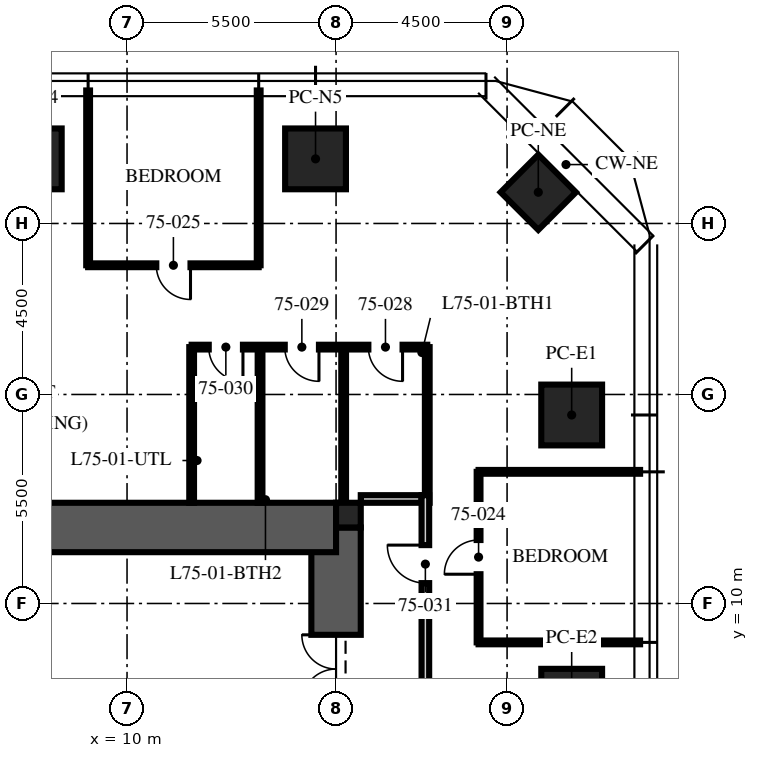
"""IFC4 building model, lengths in metres.
Left out: names, types, materials, properties, quantities, classifications, styles, units other than length and angle.
Written with IfcOpenShell. Run it as: python <this file> out.ifc"""

import sys

from ifc_helpers import new_model, si_unit, direction, frame, frame_2d, origin, origin_2d, place, context, subcontext, project, spatial, rectangle, extrude, element, fill, save


model = new_model("IFC4")
c1 = context("Model", 3, precision=1e-05, world=origin(), true_north=direction((0.0, 1.0)))
c2 = subcontext(c1, "Body", "Model", "MODEL_VIEW")
j1 = project(units=[si_unit("LENGTHUNIT", "METRE"), si_unit("PLANEANGLEUNIT", "RADIAN")], contexts=[c1])
p1 = place(None, origin())
s1 = spatial("IfcSite", under=j1, at=p1, CompositionType="ELEMENT")
p2 = place(p1, origin())
s2 = spatial("IfcBuilding", under=s1, at=p2, CompositionType="ELEMENT")
p3 = place(p2, frame((0.0, 0.0, 300.75)))
s3 = spatial("IfcBuildingStorey", under=s2, at=p3, CompositionType="ELEMENT", Elevation=300.75)
p4 = place(p3, frame((15.5, -12.0, -0.25), z_axis=(0.0, 0.0, 1.0), x_axis=(0.0, 1.0, 0.0)))
e1 = element("IfcWall", 1, at=p4, inside=s3, PredefinedType="SHEAR", context=c2, shape_type="SweptSolid", body=[
    extrude(rectangle(XDim=24.0, YDim=1.3, at=frame_2d((12.0, 0.0))), origin(), (0.0, 0.0, 1.0), 3.75),
])
p5 = place(p4, frame((3.125, 0.0, 0.25)))
e2 = element("IfcOpeningElement", 2, at=p5, cuts=e1, PredefinedType="OPENING", context=c2, shape_type="SweptSolid", body=[
    extrude(rectangle(XDim=1.2, YDim=2.1, at=frame_2d((0.6, 1.05))), frame((0.0, 0.66, 0.0), z_axis=(0.0, -1.0, 0.0), x_axis=(1.0, 0.0, 0.0)), (0.0, 0.0, 1.0), 1.32),
])
p6 = place(p4, frame((19.375, 0.0, 0.25)))
e3 = element("IfcOpeningElement", 3, at=p6, cuts=e1, PredefinedType="OPENING", context=c2, shape_type="SweptSolid", body=[
    extrude(rectangle(XDim=1.8, YDim=2.1, at=frame_2d((0.9, 1.05))), frame((0.0, 0.66, 0.0), z_axis=(0.0, -1.0, 0.0), x_axis=(1.0, 0.0, 0.0)), (0.0, 0.0, 1.0), 1.32),
])
p7 = place(p3, frame((-15.5, 12.0, -0.25), z_axis=(0.0, 0.0, 1.0), x_axis=(1.0, 0.0, 0.0)))
e4 = element("IfcWall", 4, at=p7, inside=s3, PredefinedType="SHEAR", context=c2, shape_type="SweptSolid", body=[
    extrude(rectangle(XDim=31.0, YDim=1.3, at=frame_2d((15.5, 0.0))), origin(), (0.0, 0.0, 1.0), 3.75),
])
p8 = place(p3, frame((15.825, 12.325, -0.25), z_axis=(0.0, 0.0, 1.0), x_axis=(1.0, 0.0, 0.0)))
e5 = element("IfcColumn", 5, at=p8, inside=s3, PredefinedType="COLUMN", context=c2, shape_type="SweptSolid", body=[
    extrude(rectangle(XDim=0.65, YDim=0.65, at=origin_2d()), origin(), (0.0, 0.0, 1.0), 3.75),
])
for number, where, z_axis, x_axis in (
    (6, (7.48, 21.7, 0.0), (0.0, 0.0, 1.0), (1.0, 0.0, 0.0)),
    (7, (14.96, 21.7, 0.0), (0.0, 0.0, 1.0), (1.0, 0.0, 0.0)),
    (8, (21.7, 14.96, 0.0), (0.0, 0.0, 1.0), (0.0, 1.0, 0.0)),
    (9, (21.7, 7.48, 0.0), (0.0, 0.0, 1.0), (0.0, 1.0, 0.0)),
):
    element("IfcColumn", number, at=place(p3, frame(where, z_axis=z_axis, x_axis=x_axis)), inside=s3, PredefinedType="COLUMN", context=c2, shape_type="SweptSolid", body=[
        extrude(rectangle(XDim=1.6, YDim=1.6, at=origin_2d()), origin(), (0.0, 0.0, 1.0), 3.75),
    ])
p9 = place(p3, frame((20.821, 20.821, 0.0), z_axis=(0.0, 0.0, 1.0), x_axis=(0.707106781187, -0.707106781187, 0.0)))
e10 = element("IfcColumn", 10, at=p9, inside=s3, PredefinedType="COLUMN", context=c2, shape_type="SweptSolid", body=[
    extrude(rectangle(XDim=1.4, YDim=1.4, at=origin_2d()), origin(), (0.0, 0.0, 1.0), 3.75),
])
p10 = place(p3, frame((16.15, 12.75, 0.0), z_axis=(0.0, 0.0, 1.0), x_axis=(1.0, 0.0, 0.0)))
e11 = element("IfcWall", 11, at=p10, inside=s3, PredefinedType="PARTITIONING", context=c2, shape_type="SweptSolid", body=[
    extrude(rectangle(XDim=1.6, YDim=0.2, at=frame_2d((0.8, 0.0))), origin(), (0.0, 0.0, 1.0), 2.6),
])
for number, where, z_axis, x_axis in (
    (12, (19.25, 8.976, 0.0), (0.0, 0.0, 1.0), (1.0, 0.0, 0.0)),
    (13, (19.25, 13.464, 0.0), (0.0, 0.0, 1.0), (1.0, 0.0, 0.0)),
):
    element("IfcWall", number, at=place(p3, frame(where, z_axis=z_axis, x_axis=x_axis)), inside=s3, PredefinedType="PARTITIONING", context=c2, shape_type="SweptSolid", body=[
        extrude(rectangle(XDim=4.25, YDim=0.1, at=frame_2d((2.125, 0.0))), origin(), (0.0, 0.0, 1.0), 3.01),
    ])
for number, where, z_axis, x_axis in (
    (14, (13.464, 18.9, 0.0), (0.0, 0.0, 1.0), (0.0, 1.0, 0.0)),
    (15, (8.976, 18.9, 0.0), (0.0, 0.0, 1.0), (0.0, 1.0, 0.0)),
):
    element("IfcWall", number, at=place(p3, frame(where, z_axis=z_axis, x_axis=x_axis)), inside=s3, PredefinedType="PARTITIONING", context=c2, shape_type="SweptSolid", body=[
        extrude(rectangle(XDim=4.6, YDim=0.1, at=frame_2d((2.3, 0.0))), origin(), (0.0, 0.0, 1.0), 3.01),
    ])
p11 = place(p3, frame((19.25, 8.976, 0.0), z_axis=(0.0, 0.0, 1.0), x_axis=(0.0, 1.0, 0.0)))
e16 = element("IfcWall", 16, at=p11, inside=s3, PredefinedType="PARTITIONING", context=c2, shape_type="SweptSolid", body=[
    extrude(rectangle(XDim=4.488, YDim=0.1, at=frame_2d((2.244, 0.0))), origin(), (0.0, 0.0, 1.0), 2.91),
])
p12 = place(p11, frame((1.794, 0.0, 0.0)))
e17 = element("IfcOpeningElement", 17, at=p12, cuts=e16, PredefinedType="OPENING", context=c2, shape_type="SweptSolid", body=[
    extrude(rectangle(XDim=0.9, YDim=2.1, at=frame_2d((0.45, 1.05))), frame((0.0, 0.06, 0.0), z_axis=(0.0, -1.0, 0.0), x_axis=(1.0, 0.0, 0.0)), (0.0, 0.0, 1.0), 0.12),
])
p13 = place(p3, frame((13.464, 18.9, 0.0), z_axis=(0.0, 0.0, 1.0), x_axis=(-1.0, 0.0, 0.0)))
e18 = element("IfcWall", 18, at=p13, inside=s3, PredefinedType="PARTITIONING", context=c2, shape_type="SweptSolid", body=[
    extrude(rectangle(XDim=4.488, YDim=0.1, at=frame_2d((2.244, 0.0))), origin(), (0.0, 0.0, 1.0), 2.91),
])
p14 = place(p13, frame((1.794, 0.0, 0.0)))
e19 = element("IfcOpeningElement", 19, at=p14, cuts=e18, PredefinedType="OPENING", context=c2, shape_type="SweptSolid", body=[
    extrude(rectangle(XDim=0.9, YDim=2.1, at=frame_2d((0.45, 1.05))), frame((0.0, 0.06, 0.0), z_axis=(0.0, -1.0, 0.0), x_axis=(1.0, 0.0, 0.0)), (0.0, 0.0, 1.0), 0.12),
])
p15 = place(p3, frame((17.9, 16.746, 0.0), z_axis=(0.0, 0.0, 1.0), x_axis=(-1.0, 0.0, 0.0)))
e20 = element("IfcWall", 20, at=p15, inside=s3, PredefinedType="PARTITIONING", context=c2, shape_type="SweptSolid", body=[
    extrude(rectangle(XDim=6.2, YDim=0.125, at=frame_2d((3.1, 0.0))), origin(), (0.0, 0.0, 1.0), 2.9),
])
p16 = place(p15, frame((0.65, 0.0, 0.0)))
e21 = element("IfcOpeningElement", 21, at=p16, cuts=e20, PredefinedType="OPENING", context=c2, shape_type="SweptSolid", body=[
    extrude(rectangle(XDim=0.9, YDim=2.1, at=frame_2d((0.45, 1.05))), frame((0.0, 0.073, 0.0), z_axis=(0.0, -1.0, 0.0), x_axis=(1.0, 0.0, 0.0)), (0.0, 0.0, 1.0), 0.145),
])
p17 = place(p15, frame((2.85, 0.0, 0.0)))
e22 = element("IfcOpeningElement", 22, at=p17, cuts=e20, PredefinedType="OPENING", context=c2, shape_type="SweptSolid", body=[
    extrude(rectangle(XDim=0.9, YDim=2.1, at=frame_2d((0.45, 1.05))), frame((0.0, 0.073, 0.0), z_axis=(0.0, -1.0, 0.0), x_axis=(1.0, 0.0, 0.0)), (0.0, 0.0, 1.0), 0.145),
])
p18 = place(p15, frame((4.85, 0.0, 0.0)))
e23 = element("IfcOpeningElement", 23, at=p18, cuts=e20, PredefinedType="OPENING", context=c2, shape_type="SweptSolid", body=[
    extrude(rectangle(XDim=0.9, YDim=2.1, at=frame_2d((0.45, 1.05))), frame((0.0, 0.073, 0.0), z_axis=(0.0, -1.0, 0.0), x_axis=(1.0, 0.0, 0.0)), (0.0, 0.0, 1.0), 0.145),
])
for number, where, z_axis, x_axis in (
    (24, (17.9, 12.65, 0.0), (0.0, 0.0, 1.0), (0.0, 1.0, 0.0)),
    (25, (15.7, 12.65, 0.0), (0.0, 0.0, 1.0), (0.0, 1.0, 0.0)),
):
    element("IfcWall", number, at=place(p3, frame(where, z_axis=z_axis, x_axis=x_axis)), inside=s3, PredefinedType="PARTITIONING", context=c2, shape_type="SweptSolid", body=[
        extrude(rectangle(XDim=4.096, YDim=0.125, at=frame_2d((2.048, 0.0))), origin(), (0.0, 0.0, 1.0), 2.6),
    ])
for number, where, z_axis, x_axis in (
    (26, (13.5, 12.65, 0.0), (0.0, 0.0, 1.0), (0.0, 1.0, 0.0)),
    (27, (11.7, 12.65, 0.0), (0.0, 0.0, 1.0), (0.0, 1.0, 0.0)),
):
    element("IfcWall", number, at=place(p3, frame(where, z_axis=z_axis, x_axis=x_axis)), inside=s3, PredefinedType="PARTITIONING", context=c2, shape_type="SweptSolid", body=[
        extrude(rectangle(XDim=4.096, YDim=0.125, at=frame_2d((2.048, 0.0))), origin(), (0.0, 0.0, 1.0), 3.5),
    ])
p19 = place(p3, frame((17.85, -12.65, 0.0), z_axis=(0.0, 0.0, 1.0), x_axis=(0.0, 1.0, 0.0)))
e28 = element("IfcWall", 28, at=p19, inside=s3, PredefinedType="PARTITIONING", context=c2, shape_type="SweptSolid", body=[
    extrude(rectangle(XDim=25.5, YDim=0.2, at=frame_2d((12.75, 0.0))), origin(), (0.0, 0.0, 1.0), 2.9),
])
p20 = place(p19, frame((23.186, 0.0, 0.0)))
e29 = element("IfcOpeningElement", 29, at=p20, cuts=e28, PredefinedType="OPENING", context=c2, shape_type="SweptSolid", body=[
    extrude(rectangle(XDim=1.0, YDim=2.2, at=frame_2d((0.5, 1.1))), frame((0.0, 0.11, 0.0), z_axis=(0.0, -1.0, 0.0), x_axis=(1.0, 0.0, 0.0)), (0.0, 0.0, 1.0), 0.22),
])
p21 = place(p19, frame((4.9, 0.0, 0.0)))
e30 = element("IfcOpeningElement", 30, at=p21, cuts=e28, PredefinedType="OPENING", context=c2, shape_type="SweptSolid", body=[
    extrude(rectangle(XDim=1.0, YDim=2.2, at=frame_2d((0.5, 1.1))), frame((0.0, 0.11, 0.0), z_axis=(0.0, -1.0, 0.0), x_axis=(1.0, 0.0, 0.0)), (0.0, 0.0, 1.0), 0.22),
])
p22 = place(p6, origin())
e31 = element("IfcDoor", 31, at=p22, inside=s3, OperationType="DOUBLE_DOOR_SINGLE_SWING", PredefinedType="DOOR", context=c2, shape_type="SweptSolid", body=[
    extrude(rectangle(XDim=1.8, YDim=2.1, at=frame_2d((0.9, 1.05))), frame((0.0, 0.025, 0.0), z_axis=(0.0, -1.0, 0.0), x_axis=(1.0, 0.0, 0.0)), (0.0, 0.0, 1.0), 0.05),
])
fill(e3, e31)
p23 = place(p12, origin())
e32 = element("IfcDoor", 32, at=p23, inside=s3, OperationType="SINGLE_SWING_LEFT", PredefinedType="DOOR", context=c2, shape_type="SweptSolid", body=[
    extrude(rectangle(XDim=0.9, YDim=2.1, at=frame_2d((0.45, 1.05))), frame((0.0, 0.025, 0.0), z_axis=(0.0, -1.0, 0.0), x_axis=(1.0, 0.0, 0.0)), (0.0, 0.0, 1.0), 0.05),
])
fill(e17, e32)
p24 = place(p14, origin())
e33 = element("IfcDoor", 33, at=p24, inside=s3, OperationType="SINGLE_SWING_LEFT", PredefinedType="DOOR", context=c2, shape_type="SweptSolid", body=[
    extrude(rectangle(XDim=0.9, YDim=2.1, at=frame_2d((0.45, 1.05))), frame((0.0, 0.025, 0.0), z_axis=(0.0, -1.0, 0.0), x_axis=(1.0, 0.0, 0.0)), (0.0, 0.0, 1.0), 0.05),
])
fill(e19, e33)
p25 = place(p16, origin())
e34 = element("IfcDoor", 34, at=p25, inside=s3, OperationType="SINGLE_SWING_LEFT", PredefinedType="DOOR", context=c2, shape_type="SweptSolid", body=[
    extrude(rectangle(XDim=0.9, YDim=2.1, at=frame_2d((0.45, 1.05))), frame((0.0, 0.025, 0.0), z_axis=(0.0, -1.0, 0.0), x_axis=(1.0, 0.0, 0.0)), (0.0, 0.0, 1.0), 0.05),
])
fill(e21, e34)
p26 = place(p17, origin())
e35 = element("IfcDoor", 35, at=p26, inside=s3, OperationType="SINGLE_SWING_LEFT", PredefinedType="DOOR", context=c2, shape_type="SweptSolid", body=[
    extrude(rectangle(XDim=0.9, YDim=2.1, at=frame_2d((0.45, 1.05))), frame((0.0, 0.025, 0.0), z_axis=(0.0, -1.0, 0.0), x_axis=(1.0, 0.0, 0.0)), (0.0, 0.0, 1.0), 0.05),
])
fill(e22, e35)
p27 = place(p18, origin())
e36 = element("IfcDoor", 36, at=p27, inside=s3, OperationType="SINGLE_SWING_LEFT", PredefinedType="DOOR", context=c2, shape_type="SweptSolid", body=[
    extrude(rectangle(XDim=0.9, YDim=2.1, at=frame_2d((0.45, 1.05))), frame((0.0, 0.025, 0.0), z_axis=(0.0, -1.0, 0.0), x_axis=(1.0, 0.0, 0.0)), (0.0, 0.0, 1.0), 0.05),
])
fill(e23, e36)
p28 = place(p20, origin())
e37 = element("IfcDoor", 37, at=p28, inside=s3, OperationType="SINGLE_SWING_RIGHT", PredefinedType="DOOR", context=c2, shape_type="SweptSolid", body=[
    extrude(rectangle(XDim=1.0, YDim=2.2, at=frame_2d((0.5, 1.1))), frame((0.0, 0.025, 0.0), z_axis=(0.0, -1.0, 0.0), x_axis=(1.0, 0.0, 0.0)), (0.0, 0.0, 1.0), 0.05),
])
fill(e29, e37)
save(model, sys.argv[1])
